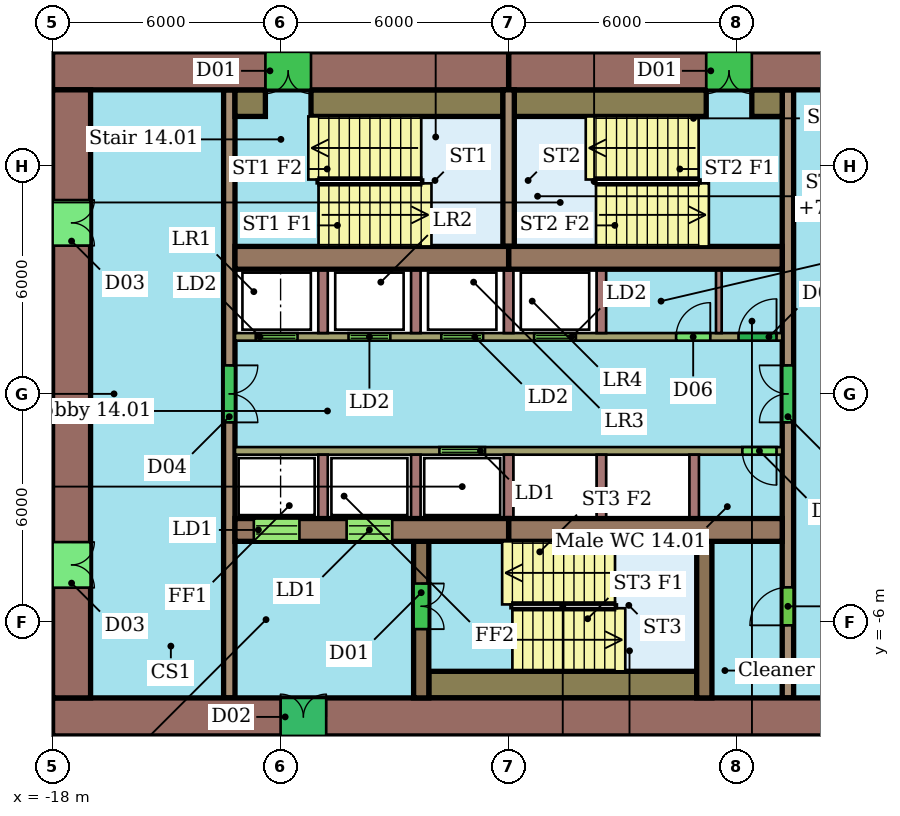
"""IFC4 building model, lengths in metres.
Left out: names, types, materials, properties, quantities, classifications, styles, units other than length and angle.
Written with IfcOpenShell. Run it as: python <this file> out.ifc"""

import sys

from ifc_helpers import new_model, si_unit, direction, frame, frame_2d, origin, place, context, subcontext, project, spatial, rectangle, extrude, element, fill, save


model = new_model("IFC4")
c1 = context("Model", 3, precision=1e-05, world=origin(), true_north=direction((0.0, 1.0)))
c2 = subcontext(c1, "Body", "Model", "MODEL_VIEW")
j1 = project(units=[si_unit("LENGTHUNIT", "METRE"), si_unit("PLANEANGLEUNIT", "RADIAN")], contexts=[c1])
p1 = place(None, origin())
s1 = spatial("IfcSite", under=j1, at=p1, CompositionType="ELEMENT")
p2 = place(p1, origin())
s2 = spatial("IfcBuilding", under=s1, at=p2, CompositionType="ELEMENT")
p3 = place(p2, frame((0.0, 0.0, 69.3)))
s3 = spatial("IfcBuildingStorey", under=s2, at=p3, CompositionType="ELEMENT", Elevation=69.3)
p4 = place(p3, frame((6.0, 8.5, 0.0), z_axis=(0.0, 0.0, 1.0), x_axis=(-1.0, 0.0, 0.0)))
e1 = element("IfcWall", 1, at=p4, inside=s3, PredefinedType="SHEAR", context=c2, shape_type="SweptSolid", body=[
    extrude(rectangle(XDim=12.0, YDim=1.0, at=frame_2d((6.0, 0.0))), origin(), (0.0, 0.0, 1.0), 3.4),
])
p5 = place(p4, frame((5.6, 0.0, 0.0)))
e2 = element("IfcOpeningElement", 2, at=p5, cuts=e1, PredefinedType="OPENING", context=c2, shape_type="SweptSolid", body=[
    extrude(rectangle(XDim=1.2, YDim=2.1, at=frame_2d((0.6, 1.05))), frame((0.0, 0.51, 0.0), z_axis=(0.0, -1.0, 0.0), x_axis=(1.0, 0.0, 0.0)), (0.0, 0.0, 1.0), 1.02),
])
p6 = place(p3, frame((-6.0, 8.5, 0.0), z_axis=(0.0, 0.0, 1.0), x_axis=(-1.0, 0.0, 0.0)))
e3 = element("IfcWall", 3, at=p6, inside=s3, PredefinedType="SHEAR", context=c2, shape_type="SweptSolid", body=[
    extrude(rectangle(XDim=12.0, YDim=1.0, at=frame_2d((6.0, 0.0))), origin(), (0.0, 0.0, 1.0), 3.4),
])
p7 = place(p6, frame((5.2, 0.0, 0.0)))
e4 = element("IfcOpeningElement", 4, at=p7, cuts=e3, PredefinedType="OPENING", context=c2, shape_type="SweptSolid", body=[
    extrude(rectangle(XDim=1.2, YDim=2.1, at=frame_2d((0.6, 1.05))), frame((0.0, 0.51, 0.0), z_axis=(0.0, -1.0, 0.0), x_axis=(1.0, 0.0, 0.0)), (0.0, 0.0, 1.0), 1.02),
])
p8 = place(p3, frame((-18.0, -8.5, 0.0), z_axis=(0.0, 0.0, 1.0), x_axis=(1.0, 0.0, 0.0)))
e5 = element("IfcWall", 5, at=p8, inside=s3, PredefinedType="SHEAR", context=c2, shape_type="SweptSolid", body=[
    extrude(rectangle(XDim=24.0, YDim=1.0, at=frame_2d((12.0, 0.0))), origin(), (0.0, 0.0, 1.0), 3.4),
])
p9 = place(p8, frame((6.0, 0.0, 0.0)))
e6 = element("IfcOpeningElement", 6, at=p9, cuts=e5, PredefinedType="OPENING", context=c2, shape_type="SweptSolid", body=[
    extrude(rectangle(XDim=1.2, YDim=2.1, at=frame_2d((0.6, 1.05))), frame((0.0, 0.51, 0.0), z_axis=(0.0, -1.0, 0.0), x_axis=(1.0, 0.0, 0.0)), (0.0, 0.0, 1.0), 1.02),
])
p10 = place(p3, frame((-17.5, 8.0, 0.0), z_axis=(0.0, 0.0, 1.0), x_axis=(0.0, -1.0, 0.0)))
e7 = element("IfcWall", 7, at=p10, inside=s3, PredefinedType="SHEAR", context=c2, shape_type="SweptSolid", body=[
    extrude(rectangle(XDim=16.0, YDim=1.0, at=frame_2d((8.0, 0.0))), origin(), (0.0, 0.0, 1.0), 3.4),
])
p11 = place(p10, frame((11.9, 0.0, 0.0)))
e8 = element("IfcOpeningElement", 8, at=p11, cuts=e7, PredefinedType="OPENING", context=c2, shape_type="SweptSolid", body=[
    extrude(rectangle(XDim=1.2, YDim=2.1, at=frame_2d((0.6, 1.05))), frame((0.0, 0.51, 0.0), z_axis=(0.0, -1.0, 0.0), x_axis=(1.0, 0.0, 0.0)), (0.0, 0.0, 1.0), 1.02),
])
p12 = place(p10, frame((2.9, 0.0, 0.0)))
e9 = element("IfcOpeningElement", 9, at=p12, cuts=e7, PredefinedType="OPENING", context=c2, shape_type="SweptSolid", body=[
    extrude(rectangle(XDim=1.2, YDim=2.1, at=frame_2d((0.6, 1.05))), frame((0.0, 0.51, 0.0), z_axis=(0.0, -1.0, 0.0), x_axis=(1.0, 0.0, 0.0)), (0.0, 0.0, 1.0), 1.02),
])
for number, where, z_axis, x_axis in (
    (10, (-13.2, 3.58, 0.0), (0.0, 0.0, 1.0), (1.0, 0.0, 0.0)),
    (11, (-6.0, 3.58, 0.0), (0.0, 0.0, 1.0), (1.0, 0.0, 0.0)),
):
    element("IfcWall", number, at=place(p3, frame(where, z_axis=z_axis, x_axis=x_axis)), inside=s3, PredefinedType="SHEAR", context=c2, shape_type="SweptSolid", body=[
        extrude(rectangle(XDim=7.2, YDim=0.6, at=frame_2d((3.6, 0.0))), origin(), (0.0, 0.0, 1.0), 3.4),
    ])
p13 = place(p3, frame((-13.2, -3.58, 0.0), z_axis=(0.0, 0.0, 1.0), x_axis=(1.0, 0.0, 0.0)))
e12 = element("IfcWall", 12, at=p13, inside=s3, PredefinedType="SHEAR", context=c2, shape_type="SweptSolid", body=[
    extrude(rectangle(XDim=7.2, YDim=0.6, at=frame_2d((3.6, 0.0))), origin(), (0.0, 0.0, 1.0), 3.4),
])
p14 = place(p13, frame((0.496, 0.0, 0.0)))
e13 = element("IfcOpeningElement", 13, at=p14, cuts=e12, PredefinedType="OPENING", context=c2, shape_type="SweptSolid", body=[
    extrude(rectangle(XDim=1.2, YDim=2.1, at=frame_2d((0.6, 1.05))), frame((0.0, 0.31, 0.0), z_axis=(0.0, -1.0, 0.0), x_axis=(1.0, 0.0, 0.0)), (0.0, 0.0, 1.0), 0.62),
])
p15 = place(p13, frame((2.938, 0.0, 0.0)))
e14 = element("IfcOpeningElement", 14, at=p15, cuts=e12, PredefinedType="OPENING", context=c2, shape_type="SweptSolid", body=[
    extrude(rectangle(XDim=1.2, YDim=2.1, at=frame_2d((0.6, 1.05))), frame((0.0, 0.31, 0.0), z_axis=(0.0, -1.0, 0.0), x_axis=(1.0, 0.0, 0.0)), (0.0, 0.0, 1.0), 0.62),
])
p16 = place(p3, frame((-6.0, -3.58, 0.0), z_axis=(0.0, 0.0, 1.0), x_axis=(1.0, 0.0, 0.0)))
e15 = element("IfcWall", 15, at=p16, inside=s3, PredefinedType="SHEAR", context=c2, shape_type="SweptSolid", body=[
    extrude(rectangle(XDim=7.2, YDim=0.6, at=frame_2d((3.6, 0.0))), origin(), (0.0, 0.0, 1.0), 3.4),
])
p17 = place(p3, frame((-13.35, 8.0, 0.0), z_axis=(0.0, 0.0, 1.0), x_axis=(0.0, -1.0, 0.0)))
e16 = element("IfcWall", 16, at=p17, inside=s3, PredefinedType="SHEAR", context=c2, shape_type="SweptSolid", body=[
    extrude(rectangle(XDim=16.0, YDim=0.3, at=frame_2d((8.0, 0.0))), origin(), (0.0, 0.0, 1.0), 3.4),
])
p18 = place(p17, frame((7.25, 0.0, 0.0)))
e17 = element("IfcOpeningElement", 17, at=p18, cuts=e16, PredefinedType="OPENING", context=c2, shape_type="SweptSolid", body=[
    extrude(rectangle(XDim=1.5, YDim=2.1, at=frame_2d((0.75, 1.05))), frame((0.0, 0.16, 0.0), z_axis=(0.0, -1.0, 0.0), x_axis=(1.0, 0.0, 0.0)), (0.0, 0.0, 1.0), 0.32),
])
p19 = place(p3, frame((1.35, -8.0, 0.0), z_axis=(0.0, 0.0, 1.0), x_axis=(0.0, 1.0, 0.0)))
e18 = element("IfcWall", 18, at=p19, inside=s3, PredefinedType="SHEAR", context=c2, shape_type="SweptSolid", body=[
    extrude(rectangle(XDim=16.0, YDim=0.3, at=frame_2d((8.0, 0.0))), origin(), (0.0, 0.0, 1.0), 3.4),
])
p20 = place(p19, frame((1.91, 0.0, 0.0)))
e19 = element("IfcOpeningElement", 19, at=p20, cuts=e18, PredefinedType="OPENING", context=c2, shape_type="SweptSolid", body=[
    extrude(rectangle(XDim=1.0, YDim=2.1, at=frame_2d((0.5, 1.05))), frame((0.0, 0.16, 0.0), z_axis=(0.0, -1.0, 0.0), x_axis=(1.0, 0.0, 0.0)), (0.0, 0.0, 1.0), 0.32),
])
p21 = place(p19, frame((7.25, 0.0, 0.0)))
e20 = element("IfcOpeningElement", 20, at=p21, cuts=e18, PredefinedType="OPENING", context=c2, shape_type="SweptSolid", body=[
    extrude(rectangle(XDim=1.5, YDim=2.1, at=frame_2d((0.75, 1.05))), frame((0.0, 0.16, 0.0), z_axis=(0.0, -1.0, 0.0), x_axis=(1.0, 0.0, 0.0)), (0.0, 0.0, 1.0), 0.32),
])
p22 = place(p3, frame((-13.2, 1.5, 0.0), z_axis=(0.0, 0.0, 1.0), x_axis=(1.0, 0.0, 0.0)))
e21 = element("IfcWall", 21, at=p22, inside=s3, PredefinedType="SHEAR", context=c2, shape_type="SweptSolid", body=[
    extrude(rectangle(XDim=14.4, YDim=0.2, at=frame_2d((7.2, 0.0))), origin(), (0.0, 0.0, 1.0), 3.4),
])
p23 = place(p22, frame((0.546, 0.0, 0.0)))
e22 = element("IfcOpeningElement", 22, at=p23, cuts=e21, PredefinedType="OPENING", context=c2, shape_type="SweptSolid", body=[
    extrude(rectangle(XDim=1.1, YDim=2.1, at=frame_2d((0.55, 1.05))), frame((0.0, 0.11, 0.0), z_axis=(0.0, -1.0, 0.0), x_axis=(1.0, 0.0, 0.0)), (0.0, 0.0, 1.0), 0.22),
])
p24 = place(p22, frame((2.988, 0.0, 0.0)))
e23 = element("IfcOpeningElement", 23, at=p24, cuts=e21, PredefinedType="OPENING", context=c2, shape_type="SweptSolid", body=[
    extrude(rectangle(XDim=1.1, YDim=2.1, at=frame_2d((0.55, 1.05))), frame((0.0, 0.11, 0.0), z_axis=(0.0, -1.0, 0.0), x_axis=(1.0, 0.0, 0.0)), (0.0, 0.0, 1.0), 0.22),
])
p25 = place(p22, frame((5.429, 0.0, 0.0)))
e24 = element("IfcOpeningElement", 24, at=p25, cuts=e21, PredefinedType="OPENING", context=c2, shape_type="SweptSolid", body=[
    extrude(rectangle(XDim=1.1, YDim=2.1, at=frame_2d((0.55, 1.05))), frame((0.0, 0.11, 0.0), z_axis=(0.0, -1.0, 0.0), x_axis=(1.0, 0.0, 0.0)), (0.0, 0.0, 1.0), 0.22),
])
p26 = place(p22, frame((7.871, 0.0, 0.0)))
e25 = element("IfcOpeningElement", 25, at=p26, cuts=e21, PredefinedType="OPENING", context=c2, shape_type="SweptSolid", body=[
    extrude(rectangle(XDim=1.1, YDim=2.1, at=frame_2d((0.55, 1.05))), frame((0.0, 0.11, 0.0), z_axis=(0.0, -1.0, 0.0), x_axis=(1.0, 0.0, 0.0)), (0.0, 0.0, 1.0), 0.22),
])
p27 = place(p22, frame((11.607, 0.0, 0.0)))
e26 = element("IfcOpeningElement", 26, at=p27, cuts=e21, PredefinedType="OPENING", context=c2, shape_type="SweptSolid", body=[
    extrude(rectangle(XDim=0.9, YDim=2.1, at=frame_2d((0.45, 1.05))), frame((0.0, 0.11, 0.0), z_axis=(0.0, -1.0, 0.0), x_axis=(1.0, 0.0, 0.0)), (0.0, 0.0, 1.0), 0.22),
])
p28 = place(p22, frame((13.25, 0.0, 0.0)))
e27 = element("IfcOpeningElement", 27, at=p28, cuts=e21, PredefinedType="OPENING", context=c2, shape_type="SweptSolid", body=[
    extrude(rectangle(XDim=1.0, YDim=2.1, at=frame_2d((0.5, 1.05))), frame((0.0, 0.11, 0.0), z_axis=(0.0, -1.0, 0.0), x_axis=(1.0, 0.0, 0.0)), (0.0, 0.0, 1.0), 0.22),
])
p29 = place(p3, frame((1.2, -1.5, 0.0), z_axis=(0.0, 0.0, 1.0), x_axis=(-1.0, 0.0, 0.0)))
e28 = element("IfcWall", 28, at=p29, inside=s3, PredefinedType="SHEAR", context=c2, shape_type="SweptSolid", body=[
    extrude(rectangle(XDim=14.4, YDim=0.2, at=frame_2d((7.2, 0.0))), origin(), (0.0, 0.0, 1.0), 3.4),
])
p30 = place(p29, frame((7.821, 0.0, 0.0)))
e29 = element("IfcOpeningElement", 29, at=p30, cuts=e28, PredefinedType="OPENING", context=c2, shape_type="SweptSolid", body=[
    extrude(rectangle(XDim=1.2, YDim=2.1, at=frame_2d((0.6, 1.05))), frame((0.0, 0.11, 0.0), z_axis=(0.0, -1.0, 0.0), x_axis=(1.0, 0.0, 0.0)), (0.0, 0.0, 1.0), 0.22),
])
p31 = place(p29, frame((0.15, 0.0, 0.0)))
e30 = element("IfcOpeningElement", 30, at=p31, cuts=e28, PredefinedType="OPENING", context=c2, shape_type="SweptSolid", body=[
    extrude(rectangle(XDim=0.9, YDim=2.1, at=frame_2d((0.45, 1.05))), frame((0.0, 0.11, 0.0), z_axis=(0.0, -1.0, 0.0), x_axis=(1.0, 0.0, 0.0)), (0.0, 0.0, 1.0), 0.22),
])
p32 = place(p3, frame((-8.3, -3.88, 0.0), z_axis=(0.0, 0.0, 1.0), x_axis=(0.0, -1.0, 0.0)))
e31 = element("IfcWall", 31, at=p32, inside=s3, PredefinedType="SHEAR", context=c2, shape_type="SweptSolid", body=[
    extrude(rectangle(XDim=4.12, YDim=0.4, at=frame_2d((2.06, 0.0))), origin(), (0.0, 0.0, 1.0), 3.4),
])
p33 = place(p32, frame((1.11, 0.0, 0.0)))
e32 = element("IfcOpeningElement", 32, at=p33, cuts=e31, PredefinedType="OPENING", context=c2, shape_type="SweptSolid", body=[
    extrude(rectangle(XDim=1.2, YDim=2.1, at=frame_2d((0.6, 1.05))), frame((0.0, 0.21, 0.0), z_axis=(0.0, -1.0, 0.0), x_axis=(1.0, 0.0, 0.0)), (0.0, 0.0, 1.0), 0.42),
])
p34 = place(p3, frame((-0.85, -3.88, 0.0), z_axis=(0.0, 0.0, 1.0), x_axis=(0.0, -1.0, 0.0)))
e33 = element("IfcWall", 33, at=p34, inside=s3, PredefinedType="SHEAR", context=c2, shape_type="SweptSolid", body=[
    extrude(rectangle(XDim=4.12, YDim=0.4, at=frame_2d((2.06, 0.0))), origin(), (0.0, 0.0, 1.0), 3.4),
])
p35 = place(p3, frame((-6.0, 3.88, 0.0), z_axis=(0.0, 0.0, 1.0), x_axis=(0.0, 1.0, 0.0)))
e34 = element("IfcWall", 34, at=p35, inside=s3, PredefinedType="SHEAR", context=c2, shape_type="SweptSolid", body=[
    extrude(rectangle(XDim=4.12, YDim=0.3, at=frame_2d((2.06, 0.0))), origin(), (0.0, 0.0, 1.0), 3.4),
])
p36 = place(p3, frame((-13.2, 7.65, 0.0), z_axis=(0.0, 0.0, 1.0), x_axis=(1.0, 0.0, 0.0)))
e35 = element("IfcWall", 35, at=p36, inside=s3, PredefinedType="SHEAR", context=c2, shape_type="SweptSolid", body=[
    extrude(rectangle(XDim=0.8, YDim=0.7, at=frame_2d((0.4, 0.0))), origin(), (0.0, 0.0, 1.0), 3.4),
])
for number, where, z_axis, x_axis in (
    (36, (-11.2, 7.65, 0.0), (0.0, 0.0, 1.0), (1.0, 0.0, 0.0)),
    (37, (-5.85, 7.65, 0.0), (0.0, 0.0, 1.0), (1.0, 0.0, 0.0)),
):
    element("IfcWall", number, at=place(p3, frame(where, z_axis=z_axis, x_axis=x_axis)), inside=s3, PredefinedType="SHEAR", context=c2, shape_type="SweptSolid", body=[
        extrude(rectangle(XDim=5.05, YDim=0.7, at=frame_2d((2.525, 0.0))), origin(), (0.0, 0.0, 1.0), 3.4),
    ])
p37 = place(p3, frame((0.4, 7.65, 0.0), z_axis=(0.0, 0.0, 1.0), x_axis=(1.0, 0.0, 0.0)))
e38 = element("IfcWall", 38, at=p37, inside=s3, PredefinedType="SHEAR", context=c2, shape_type="SweptSolid", body=[
    extrude(rectangle(XDim=0.8, YDim=0.7, at=frame_2d((0.4, 0.0))), origin(), (0.0, 0.0, 1.0), 3.4),
])
p38 = place(p3, frame((-8.1, -7.65, 0.0), z_axis=(0.0, 0.0, 1.0), x_axis=(1.0, 0.0, 0.0)))
e39 = element("IfcWall", 39, at=p38, inside=s3, PredefinedType="SHEAR", context=c2, shape_type="SweptSolid", body=[
    extrude(rectangle(XDim=7.05, YDim=0.7, at=frame_2d((3.525, 0.0))), origin(), (0.0, 0.0, 1.0), 3.4),
])
for number, where, z_axis, x_axis in (
    (40, (-10.883, 1.6, 0.0), (0.0, 0.0, 1.0), (0.0, 1.0, 0.0)),
    (41, (-8.442, 1.6, 0.0), (0.0, 0.0, 1.0), (0.0, 1.0, 0.0)),
    (42, (-6.0, 1.6, 0.0), (0.0, 0.0, 1.0), (0.0, 1.0, 0.0)),
    (43, (-3.558, 1.6, 0.0), (0.0, 0.0, 1.0), (0.0, 1.0, 0.0)),
):
    element("IfcWall", number, at=place(p3, frame(where, z_axis=z_axis, x_axis=x_axis)), inside=s3, PredefinedType="SHEAR", context=c2, shape_type="SweptSolid", body=[
        extrude(rectangle(XDim=1.68, YDim=0.25, at=frame_2d((0.84, 0.0))), origin(), (0.0, 0.0, 1.0), 3.4),
    ])
p39 = place(p3, frame((-0.468, 1.6, 0.0), z_axis=(0.0, 0.0, 1.0), x_axis=(0.0, 1.0, 0.0)))
e44 = element("IfcWall", 44, at=p39, inside=s3, PredefinedType="PARTITIONING", context=c2, shape_type="SweptSolid", body=[
    extrude(rectangle(XDim=1.68, YDim=0.15, at=frame_2d((0.84, 0.0))), origin(), (0.0, 0.0, 1.0), 3.4),
])
for number, where, z_axis, x_axis in (
    (45, (-10.883, -1.6, 0.0), (0.0, 0.0, 1.0), (0.0, -1.0, 0.0)),
    (46, (-8.442, -1.6, 0.0), (0.0, 0.0, 1.0), (0.0, -1.0, 0.0)),
    (47, (-6.0, -1.6, 0.0), (0.0, 0.0, 1.0), (0.0, -1.0, 0.0)),
    (48, (-3.558, -1.6, 0.0), (0.0, 0.0, 1.0), (0.0, -1.0, 0.0)),
    (49, (-1.117, -1.6, 0.0), (0.0, 0.0, 1.0), (0.0, -1.0, 0.0)),
):
    element("IfcWall", number, at=place(p3, frame(where, z_axis=z_axis, x_axis=x_axis)), inside=s3, PredefinedType="SHEAR", context=c2, shape_type="SweptSolid", body=[
        extrude(rectangle(XDim=1.68, YDim=0.25, at=frame_2d((0.84, 0.0))), origin(), (0.0, 0.0, 1.0), 3.4),
    ])
p40 = place(p5, origin())
e50 = element("IfcDoor", 50, at=p40, inside=s3, OperationType="DOUBLE_DOOR_SINGLE_SWING", PredefinedType="NOTDEFINED", context=c2, shape_type="SweptSolid", body=[
    extrude(rectangle(XDim=1.2, YDim=2.1, at=frame_2d((0.6, 1.05))), frame((0.0, 0.025, 0.0), z_axis=(0.0, -1.0, 0.0), x_axis=(1.0, 0.0, 0.0)), (0.0, 0.0, 1.0), 0.05),
])
fill(e2, e50)
p41 = place(p7, origin())
e51 = element("IfcDoor", 51, at=p41, inside=s3, OperationType="DOUBLE_DOOR_SINGLE_SWING", PredefinedType="NOTDEFINED", context=c2, shape_type="SweptSolid", body=[
    extrude(rectangle(XDim=1.2, YDim=2.1, at=frame_2d((0.6, 1.05))), frame((0.0, 0.025, 0.0), z_axis=(0.0, -1.0, 0.0), x_axis=(1.0, 0.0, 0.0)), (0.0, 0.0, 1.0), 0.05),
])
fill(e4, e51)
p42 = place(p9, origin())
e52 = element("IfcDoor", 52, at=p42, inside=s3, OperationType="DOUBLE_DOOR_SINGLE_SWING", PredefinedType="NOTDEFINED", context=c2, shape_type="SweptSolid", body=[
    extrude(rectangle(XDim=1.2, YDim=2.1, at=frame_2d((0.6, 1.05))), frame((0.0, 0.025, 0.0), z_axis=(0.0, -1.0, 0.0), x_axis=(1.0, 0.0, 0.0)), (0.0, 0.0, 1.0), 0.05),
])
fill(e6, e52)
p43 = place(p11, origin())
e53 = element("IfcDoor", 53, at=p43, inside=s3, OperationType="DOUBLE_DOOR_SINGLE_SWING", PredefinedType="NOTDEFINED", context=c2, shape_type="SweptSolid", body=[
    extrude(rectangle(XDim=1.2, YDim=2.1, at=frame_2d((0.6, 1.05))), frame((0.0, 0.025, 0.0), z_axis=(0.0, -1.0, 0.0), x_axis=(1.0, 0.0, 0.0)), (0.0, 0.0, 1.0), 0.05),
])
fill(e8, e53)
p44 = place(p12, origin())
e54 = element("IfcDoor", 54, at=p44, inside=s3, OperationType="DOUBLE_DOOR_SINGLE_SWING", PredefinedType="NOTDEFINED", context=c2, shape_type="SweptSolid", body=[
    extrude(rectangle(XDim=1.2, YDim=2.1, at=frame_2d((0.6, 1.05))), frame((0.0, 0.025, 0.0), z_axis=(0.0, -1.0, 0.0), x_axis=(1.0, 0.0, 0.0)), (0.0, 0.0, 1.0), 0.05),
])
fill(e9, e54)
p45 = place(p14, origin())
e55 = element("IfcDoor", 55, at=p45, inside=s3, OperationType="DOUBLE_DOOR_SLIDING", PredefinedType="NOTDEFINED", context=c2, shape_type="SweptSolid", body=[
    extrude(rectangle(XDim=1.2, YDim=2.1, at=frame_2d((0.6, 1.05))), frame((0.0, 0.025, 0.0), z_axis=(0.0, -1.0, 0.0), x_axis=(1.0, 0.0, 0.0)), (0.0, 0.0, 1.0), 0.05),
])
fill(e13, e55)
p46 = place(p15, origin())
e56 = element("IfcDoor", 56, at=p46, inside=s3, OperationType="DOUBLE_DOOR_SLIDING", PredefinedType="NOTDEFINED", context=c2, shape_type="SweptSolid", body=[
    extrude(rectangle(XDim=1.2, YDim=2.1, at=frame_2d((0.6, 1.05))), frame((0.0, 0.025, 0.0), z_axis=(0.0, -1.0, 0.0), x_axis=(1.0, 0.0, 0.0)), (0.0, 0.0, 1.0), 0.05),
])
fill(e14, e56)
p47 = place(p18, origin())
e57 = element("IfcDoor", 57, at=p47, inside=s3, OperationType="DOUBLE_DOOR_SINGLE_SWING", PredefinedType="NOTDEFINED", context=c2, shape_type="SweptSolid", body=[
    extrude(rectangle(XDim=1.5, YDim=2.1, at=frame_2d((0.75, 1.05))), frame((0.0, 0.025, 0.0), z_axis=(0.0, -1.0, 0.0), x_axis=(1.0, 0.0, 0.0)), (0.0, 0.0, 1.0), 0.05),
])
fill(e17, e57)
p48 = place(p20, origin())
e58 = element("IfcDoor", 58, at=p48, inside=s3, OperationType="SINGLE_SWING_LEFT", PredefinedType="NOTDEFINED", context=c2, shape_type="SweptSolid", body=[
    extrude(rectangle(XDim=1.0, YDim=2.1, at=frame_2d((0.5, 1.05))), frame((0.0, 0.025, 0.0), z_axis=(0.0, -1.0, 0.0), x_axis=(1.0, 0.0, 0.0)), (0.0, 0.0, 1.0), 0.05),
])
fill(e19, e58)
p49 = place(p21, origin())
e59 = element("IfcDoor", 59, at=p49, inside=s3, OperationType="DOUBLE_DOOR_SINGLE_SWING", PredefinedType="NOTDEFINED", context=c2, shape_type="SweptSolid", body=[
    extrude(rectangle(XDim=1.5, YDim=2.1, at=frame_2d((0.75, 1.05))), frame((0.0, 0.025, 0.0), z_axis=(0.0, -1.0, 0.0), x_axis=(1.0, 0.0, 0.0)), (0.0, 0.0, 1.0), 0.05),
])
fill(e20, e59)
p50 = place(p23, origin())
e60 = element("IfcDoor", 60, at=p50, inside=s3, OperationType="DOUBLE_DOOR_SLIDING", PredefinedType="NOTDEFINED", context=c2, shape_type="SweptSolid", body=[
    extrude(rectangle(XDim=1.1, YDim=2.1, at=frame_2d((0.55, 1.05))), frame((0.0, 0.025, 0.0), z_axis=(0.0, -1.0, 0.0), x_axis=(1.0, 0.0, 0.0)), (0.0, 0.0, 1.0), 0.05),
])
fill(e22, e60)
p51 = place(p24, origin())
e61 = element("IfcDoor", 61, at=p51, inside=s3, OperationType="DOUBLE_DOOR_SLIDING", PredefinedType="NOTDEFINED", context=c2, shape_type="SweptSolid", body=[
    extrude(rectangle(XDim=1.1, YDim=2.1, at=frame_2d((0.55, 1.05))), frame((0.0, 0.025, 0.0), z_axis=(0.0, -1.0, 0.0), x_axis=(1.0, 0.0, 0.0)), (0.0, 0.0, 1.0), 0.05),
])
fill(e23, e61)
p52 = place(p25, origin())
e62 = element("IfcDoor", 62, at=p52, inside=s3, OperationType="DOUBLE_DOOR_SLIDING", PredefinedType="NOTDEFINED", context=c2, shape_type="SweptSolid", body=[
    extrude(rectangle(XDim=1.1, YDim=2.1, at=frame_2d((0.55, 1.05))), frame((0.0, 0.025, 0.0), z_axis=(0.0, -1.0, 0.0), x_axis=(1.0, 0.0, 0.0)), (0.0, 0.0, 1.0), 0.05),
])
fill(e24, e62)
p53 = place(p26, origin())
e63 = element("IfcDoor", 63, at=p53, inside=s3, OperationType="DOUBLE_DOOR_SLIDING", PredefinedType="NOTDEFINED", context=c2, shape_type="SweptSolid", body=[
    extrude(rectangle(XDim=1.1, YDim=2.1, at=frame_2d((0.55, 1.05))), frame((0.0, 0.025, 0.0), z_axis=(0.0, -1.0, 0.0), x_axis=(1.0, 0.0, 0.0)), (0.0, 0.0, 1.0), 0.05),
])
fill(e25, e63)
p54 = place(p27, origin())
e64 = element("IfcDoor", 64, at=p54, inside=s3, OperationType="SINGLE_SWING_RIGHT", PredefinedType="NOTDEFINED", context=c2, shape_type="SweptSolid", body=[
    extrude(rectangle(XDim=0.9, YDim=2.1, at=frame_2d((0.45, 1.05))), frame((0.0, 0.025, 0.0), z_axis=(0.0, -1.0, 0.0), x_axis=(1.0, 0.0, 0.0)), (0.0, 0.0, 1.0), 0.05),
])
fill(e26, e64)
p55 = place(p28, origin())
e65 = element("IfcDoor", 65, at=p55, inside=s3, OperationType="SINGLE_SWING_RIGHT", PredefinedType="NOTDEFINED", context=c2, shape_type="SweptSolid", body=[
    extrude(rectangle(XDim=1.0, YDim=2.1, at=frame_2d((0.5, 1.05))), frame((0.0, 0.025, 0.0), z_axis=(0.0, -1.0, 0.0), x_axis=(1.0, 0.0, 0.0)), (0.0, 0.0, 1.0), 0.05),
])
fill(e27, e65)
p56 = place(p30, origin())
e66 = element("IfcDoor", 66, at=p56, inside=s3, OperationType="DOUBLE_DOOR_SLIDING", PredefinedType="NOTDEFINED", context=c2, shape_type="SweptSolid", body=[
    extrude(rectangle(XDim=1.2, YDim=2.1, at=frame_2d((0.6, 1.05))), frame((0.0, 0.025, 0.0), z_axis=(0.0, -1.0, 0.0), x_axis=(1.0, 0.0, 0.0)), (0.0, 0.0, 1.0), 0.05),
])
fill(e29, e66)
p57 = place(p31, origin())
e67 = element("IfcDoor", 67, at=p57, inside=s3, OperationType="SINGLE_SWING_LEFT", PredefinedType="NOTDEFINED", context=c2, shape_type="SweptSolid", body=[
    extrude(rectangle(XDim=0.9, YDim=2.1, at=frame_2d((0.45, 1.05))), frame((0.0, 0.025, 0.0), z_axis=(0.0, -1.0, 0.0), x_axis=(1.0, 0.0, 0.0)), (0.0, 0.0, 1.0), 0.05),
])
fill(e30, e67)
p58 = place(p33, origin())
e68 = element("IfcDoor", 68, at=p58, inside=s3, OperationType="DOUBLE_DOOR_SINGLE_SWING", PredefinedType="NOTDEFINED", context=c2, shape_type="SweptSolid", body=[
    extrude(rectangle(XDim=1.2, YDim=2.1, at=frame_2d((0.6, 1.05))), frame((0.0, 0.025, 0.0), z_axis=(0.0, -1.0, 0.0), x_axis=(1.0, 0.0, 0.0)), (0.0, 0.0, 1.0), 0.05),
])
fill(e32, e68)
save(model, sys.argv[1])
